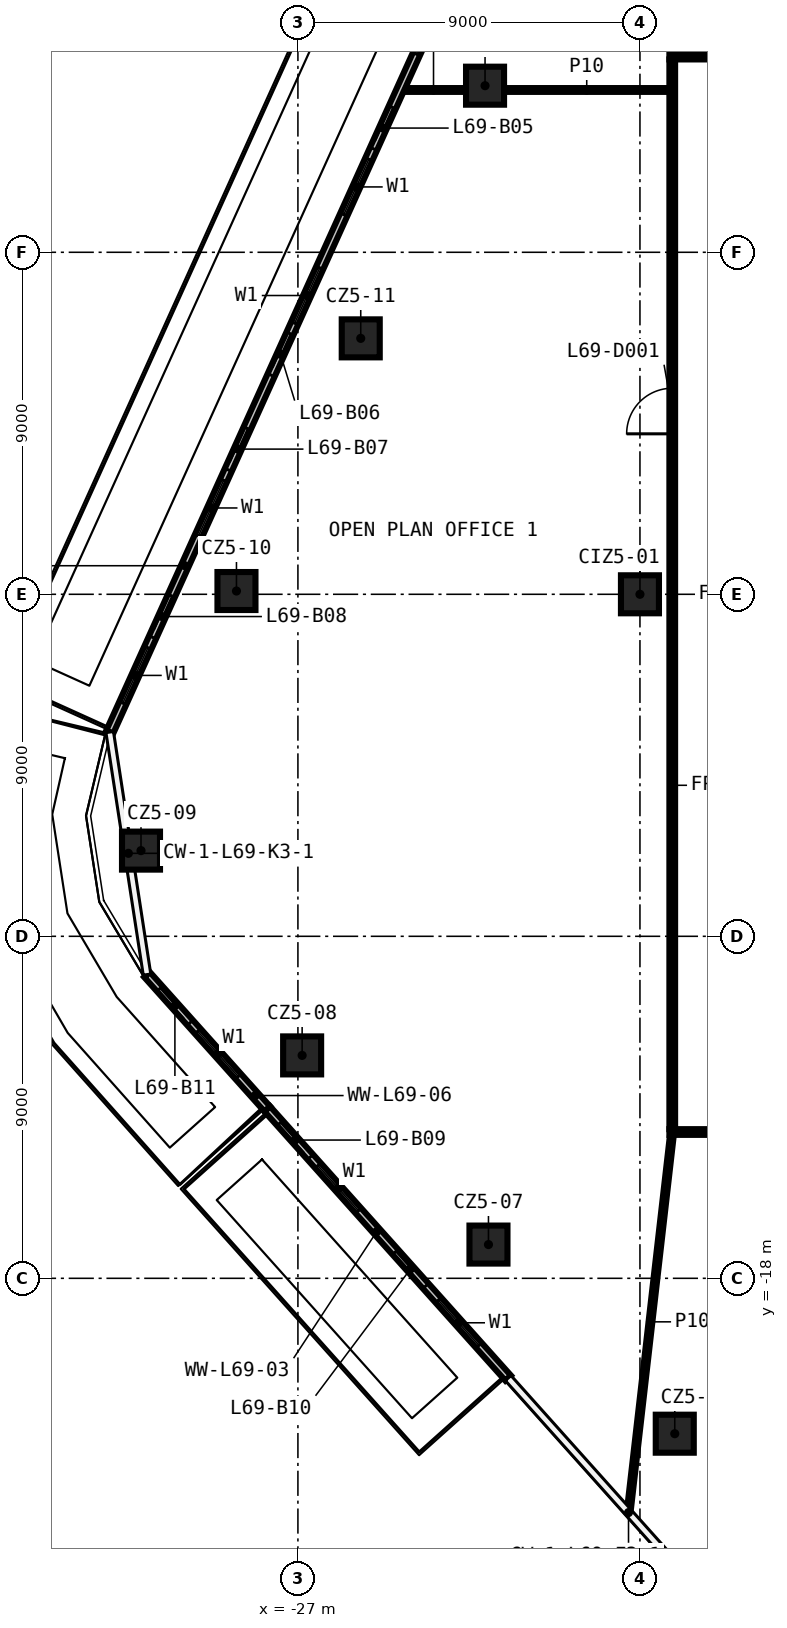
"""IFC4 building model, lengths in metres.
Left out: names, types, materials, properties, quantities, classifications, styles, units other than length and angle.
Written with IfcOpenShell. Run it as: python <this file> out.ifc"""

import sys

from ifc_helpers import new_model, si_unit, direction, frame, frame_2d, origin, origin_2d, place, context, subcontext, project, spatial, rectangle, extrude, element, fill, save


model = new_model("IFC4")
c1 = context("Model", 3, precision=1e-05, world=origin(), true_north=direction((0.0, 1.0)))
c2 = subcontext(c1, "Body", "Model", "MODEL_VIEW")
j1 = project(units=[si_unit("LENGTHUNIT", "METRE"), si_unit("PLANEANGLEUNIT", "RADIAN")], contexts=[c1])
p1 = place(None, origin())
s1 = spatial("IfcSite", under=j1, at=p1, CompositionType="ELEMENT")
p2 = place(p1, origin())
s2 = spatial("IfcBuilding", under=s1, at=p2, CompositionType="ELEMENT")
p3 = place(p2, frame((0.0, 0.0, 323.6)))
s3 = spatial("IfcBuildingStorey", under=s2, at=p3, CompositionType="ELEMENT", Elevation=323.6)
for number, where, z_axis, x_axis in (
    (1, (-17.084, -22.089, 0.0), (0.0, 0.0, 1.0), (1.0, 0.0, 0.0)),
    (2, (-21.986, -17.112, 0.0), (0.0, 0.0, 1.0), (1.0, 0.0, 0.0)),
    (3, (-26.889, -12.134, 0.0), (0.0, 0.0, 1.0), (1.0, 0.0, 0.0)),
    (4, (-31.129, -6.745, 0.0), (0.0, 0.0, 1.0), (1.0, 0.0, 0.0)),
    (5, (-28.617, 0.086, 0.0), (0.0, 0.0, 1.0), (1.0, 0.0, 0.0)),
    (6, (-25.347, 6.735, 0.0), (0.0, 0.0, 1.0), (1.0, 0.0, 0.0)),
    (7, (-22.076, 13.384, 0.0), (0.0, 0.0, 1.0), (1.0, 0.0, 0.0)),
    (8, (-18.0, 0.0, 0.0), (0.0, 0.0, 1.0), (1.0, 0.0, 0.0)),
):
    element("IfcColumn", number, at=place(p3, frame(where, z_axis=z_axis, x_axis=x_axis)), inside=s3, PredefinedType="COLUMN", context=c2, shape_type="SweptSolid", body=[
        extrude(rectangle(XDim=1.0, YDim=1.0, at=origin_2d()), origin(), (0.0, 0.0, 1.0), 3.82),
    ])
p4 = place(p3, frame((17.225, -14.15, 0.0), z_axis=(0.0, 0.0, 1.0), x_axis=(-1.0, 0.0, 0.0)))
e9 = element("IfcWall", 9, at=p4, inside=s3, PredefinedType="PARTITIONING", context=c2, shape_type="SweptSolid", body=[
    extrude(rectangle(XDim=34.45, YDim=0.15, at=frame_2d((17.225, 0.0))), origin(), (0.0, 0.0, 1.0), 3.82),
])
p5 = place(p4, frame((17.711, 0.0, 0.0)))
e10 = element("IfcOpeningElement", 10, at=p5, cuts=e9, PredefinedType="OPENING", context=c2, shape_type="SweptSolid", body=[
    extrude(rectangle(XDim=1.2, YDim=2.1, at=frame_2d((0.6, 1.05))), frame((0.0, 0.085, 0.0), z_axis=(0.0, -1.0, 0.0), x_axis=(1.0, 0.0, 0.0)), (0.0, 0.0, 1.0), 0.17),
])
p6 = place(p4, frame((4.094, 0.0, 0.0)))
e11 = element("IfcOpeningElement", 11, at=p6, cuts=e9, PredefinedType="OPENING", context=c2, shape_type="SweptSolid", body=[
    extrude(rectangle(XDim=1.2, YDim=2.1, at=frame_2d((0.6, 1.05))), frame((0.0, 0.085, 0.0), z_axis=(0.0, -1.0, 0.0), x_axis=(1.0, 0.0, 0.0)), (0.0, 0.0, 1.0), 0.17),
])
p7 = place(p3, frame((-24.288, 13.271, 0.0), z_axis=(0.0, 0.0, 1.0), x_axis=(1.0, 0.0, 0.0)))
e12 = element("IfcWall", 12, at=p7, inside=s3, PredefinedType="PARTITIONING", context=c2, shape_type="SweptSolid", body=[
    extrude(rectangle(XDim=1.712, YDim=0.1, at=frame_2d((0.856, 0.0))), origin(), (0.0, 0.0, 1.0), 3.82),
])
p8 = place(p3, frame((-21.576, 13.271, 0.0), z_axis=(0.0, 0.0, 1.0), x_axis=(1.0, 0.0, 0.0)))
e13 = element("IfcWall", 13, at=p8, inside=s3, PredefinedType="PARTITIONING", context=c2, shape_type="SweptSolid", body=[
    extrude(rectangle(XDim=4.351, YDim=0.1, at=frame_2d((2.175, 0.0))), origin(), (0.0, 0.0, 1.0), 3.82),
])
p9 = place(p3, frame((-17.225, 14.15, 0.0), z_axis=(0.0, 0.0, 1.0), x_axis=(1.0, 0.0, 0.0)))
e14 = element("IfcWall", 14, at=p9, inside=s3, PredefinedType="PARTITIONING", context=c2, shape_type="SweptSolid", body=[
    extrude(rectangle(XDim=34.45, YDim=0.15, at=frame_2d((17.225, 0.0))), origin(), (0.0, 0.0, 1.0), 3.82),
])
p10 = place(p9, frame((17.706, 0.0, 0.0)))
e15 = element("IfcOpeningElement", 15, at=p10, cuts=e14, PredefinedType="OPENING", context=c2, shape_type="SweptSolid", body=[
    extrude(rectangle(XDim=1.2, YDim=2.1, at=frame_2d((0.6, 1.05))), frame((0.0, 0.085, 0.0), z_axis=(0.0, -1.0, 0.0), x_axis=(1.0, 0.0, 0.0)), (0.0, 0.0, 1.0), 0.17),
])
p11 = place(p3, frame((-18.296, -24.14, 0.0), z_axis=(0.0, 0.0, 1.0), x_axis=(0.11391359401, 0.993490660801, 0.0)))
e16 = element("IfcWall", 16, at=p11, inside=s3, PredefinedType="PARTITIONING", context=c2, shape_type="SweptSolid", body=[
    extrude(rectangle(XDim=10.056, YDim=0.1, at=frame_2d((5.028, 0.0))), origin(), (0.0, 0.0, 1.0), 3.82),
])
p12 = place(p3, frame((-17.15, -14.075, 0.0), z_axis=(0.0, 0.0, 1.0), x_axis=(0.0, 1.0, 0.0)))
e17 = element("IfcWall", 17, at=p12, inside=s3, PredefinedType="PARTITIONING", context=c2, shape_type="SweptSolid", body=[
    extrude(rectangle(XDim=28.15, YDim=0.15, at=frame_2d((14.075, 0.0))), origin(), (0.0, 0.0, 1.0), 3.82),
])
p13 = place(p12, frame((18.298, 0.0, 0.0)))
e18 = element("IfcOpeningElement", 18, at=p13, cuts=e17, PredefinedType="OPENING", context=c2, shape_type="SweptSolid", body=[
    extrude(rectangle(XDim=1.2, YDim=2.1, at=frame_2d((0.6, 1.05))), frame((0.0, 0.085, 0.0), z_axis=(0.0, -1.0, 0.0), x_axis=(1.0, 0.0, 0.0)), (0.0, 0.0, 1.0), 0.17),
])
p14 = place(p3, frame((-22.399, 17.495, 0.0), z_axis=(0.0, 0.0, 1.0), x_axis=(-0.412123946496, -0.911127791654, 0.0)))
e19 = element("IfcWall", 19, at=p14, inside=s3, PredefinedType="SOLIDWALL", context=c2, shape_type="SweptSolid", body=[
    extrude(rectangle(XDim=23.18, YDim=0.2, at=frame_2d((11.59, 0.0))), origin(), (0.0, 0.0, 1.0), 3.82),
])
p15 = place(p14, frame((2.0, 0.0, 0.6)))
e20 = element("IfcOpeningElement", 20, at=p15, cuts=e19, PredefinedType="OPENING", context=c2, shape_type="SweptSolid", body=[
    extrude(rectangle(XDim=1.6, YDim=2.4, at=frame_2d((0.8, 1.2))), frame((0.0, 0.11, 0.0), z_axis=(0.0, -1.0, 0.0), x_axis=(1.0, 0.0, 0.0)), (0.0, 0.0, 1.0), 0.22),
])
p16 = place(p14, frame((0.5, 0.0, 0.0)))
e21 = element("IfcOpeningElement", 21, at=p16, cuts=e19, PredefinedType="OPENING", context=c2, shape_type="SweptSolid", body=[
    extrude(rectangle(XDim=1.2, YDim=2.4, at=frame_2d((0.6, 1.2))), frame((0.0, 0.11, 0.0), z_axis=(0.0, -1.0, 0.0), x_axis=(1.0, 0.0, 0.0)), (0.0, 0.0, 1.0), 0.22),
])
p17 = place(p14, frame((6.636, 0.0, 0.6)))
e22 = element("IfcOpeningElement", 22, at=p17, cuts=e19, PredefinedType="OPENING", context=c2, shape_type="SweptSolid", body=[
    extrude(rectangle(XDim=1.6, YDim=2.4, at=frame_2d((0.8, 1.2))), frame((0.0, 0.11, 0.0), z_axis=(0.0, -1.0, 0.0), x_axis=(1.0, 0.0, 0.0)), (0.0, 0.0, 1.0), 0.22),
])
p18 = place(p14, frame((5.136, 0.0, 0.0)))
e23 = element("IfcOpeningElement", 23, at=p18, cuts=e19, PredefinedType="OPENING", context=c2, shape_type="SweptSolid", body=[
    extrude(rectangle(XDim=1.2, YDim=2.4, at=frame_2d((0.6, 1.2))), frame((0.0, 0.11, 0.0), z_axis=(0.0, -1.0, 0.0), x_axis=(1.0, 0.0, 0.0)), (0.0, 0.0, 1.0), 0.22),
])
p19 = place(p14, frame((9.772, 0.0, 0.6)))
e24 = element("IfcOpeningElement", 24, at=p19, cuts=e19, PredefinedType="OPENING", context=c2, shape_type="SweptSolid", body=[
    extrude(rectangle(XDim=1.6, YDim=2.4, at=frame_2d((0.8, 1.2))), frame((0.0, 0.11, 0.0), z_axis=(0.0, -1.0, 0.0), x_axis=(1.0, 0.0, 0.0)), (0.0, 0.0, 1.0), 0.22),
])
p20 = place(p14, frame((11.672, 0.0, 0.0)))
e25 = element("IfcOpeningElement", 25, at=p20, cuts=e19, PredefinedType="OPENING", context=c2, shape_type="SweptSolid", body=[
    extrude(rectangle(XDim=1.2, YDim=2.4, at=frame_2d((0.6, 1.2))), frame((0.0, 0.11, 0.0), z_axis=(0.0, -1.0, 0.0), x_axis=(1.0, 0.0, 0.0)), (0.0, 0.0, 1.0), 0.22),
])
p21 = place(p14, frame((15.908, 0.0, 0.6)))
e26 = element("IfcOpeningElement", 26, at=p21, cuts=e19, PredefinedType="OPENING", context=c2, shape_type="SweptSolid", body=[
    extrude(rectangle(XDim=1.6, YDim=2.4, at=frame_2d((0.8, 1.2))), frame((0.0, 0.11, 0.0), z_axis=(0.0, -1.0, 0.0), x_axis=(1.0, 0.0, 0.0)), (0.0, 0.0, 1.0), 0.22),
])
p22 = place(p14, frame((14.408, 0.0, 0.0)))
e27 = element("IfcOpeningElement", 27, at=p22, cuts=e19, PredefinedType="OPENING", context=c2, shape_type="SweptSolid", body=[
    extrude(rectangle(XDim=1.2, YDim=2.4, at=frame_2d((0.6, 1.2))), frame((0.0, 0.11, 0.0), z_axis=(0.0, -1.0, 0.0), x_axis=(1.0, 0.0, 0.0)), (0.0, 0.0, 1.0), 0.22),
])
p23 = place(p14, frame((20.744, 0.0, 0.6)))
e28 = element("IfcOpeningElement", 28, at=p23, cuts=e19, PredefinedType="OPENING", context=c2, shape_type="SweptSolid", body=[
    extrude(rectangle(XDim=1.6, YDim=2.4, at=frame_2d((0.8, 1.2))), frame((0.0, 0.11, 0.0), z_axis=(0.0, -1.0, 0.0), x_axis=(1.0, 0.0, 0.0)), (0.0, 0.0, 1.0), 0.22),
])
p24 = place(p14, frame((19.244, 0.0, 0.0)))
e29 = element("IfcOpeningElement", 29, at=p24, cuts=e19, PredefinedType="OPENING", context=c2, shape_type="SweptSolid", body=[
    extrude(rectangle(XDim=1.2, YDim=2.4, at=frame_2d((0.6, 1.2))), frame((0.0, 0.11, 0.0), z_axis=(0.0, -1.0, 0.0), x_axis=(1.0, 0.0, 0.0)), (0.0, 0.0, 1.0), 0.22),
])
p25 = place(p3, frame((-27.807, -13.542, 0.0), z_axis=(0.0, 0.0, 1.0), x_axis=(0.666894702572, -0.745151968179, 0.0)))
e30 = element("IfcWall", 30, at=p25, inside=s3, PredefinedType="SOLIDWALL", context=c2, shape_type="SweptSolid", body=[
    extrude(rectangle(XDim=9.506, YDim=0.2, at=frame_2d((4.753, 0.0))), origin(), (0.0, 0.0, 1.0), 3.82),
])
p26 = place(p25, frame((2.0, 0.0, 0.6)))
e31 = element("IfcOpeningElement", 31, at=p26, cuts=e30, PredefinedType="OPENING", context=c2, shape_type="SweptSolid", body=[
    extrude(rectangle(XDim=1.6, YDim=2.4, at=frame_2d((0.8, 1.2))), frame((0.0, 0.11, 0.0), z_axis=(0.0, -1.0, 0.0), x_axis=(1.0, 0.0, 0.0)), (0.0, 0.0, 1.0), 0.22),
])
p27 = place(p25, frame((0.5, 0.0, 0.0)))
e32 = element("IfcOpeningElement", 32, at=p27, cuts=e30, PredefinedType="OPENING", context=c2, shape_type="SweptSolid", body=[
    extrude(rectangle(XDim=1.2, YDim=2.4, at=frame_2d((0.6, 1.2))), frame((0.0, 0.11, 0.0), z_axis=(0.0, -1.0, 0.0), x_axis=(1.0, 0.0, 0.0)), (0.0, 0.0, 1.0), 0.22),
])
p28 = place(p25, frame((6.753, 0.0, 0.6)))
e33 = element("IfcOpeningElement", 33, at=p28, cuts=e30, PredefinedType="OPENING", context=c2, shape_type="SweptSolid", body=[
    extrude(rectangle(XDim=1.6, YDim=2.4, at=frame_2d((0.8, 1.2))), frame((0.0, 0.11, 0.0), z_axis=(0.0, -1.0, 0.0), x_axis=(1.0, 0.0, 0.0)), (0.0, 0.0, 1.0), 0.22),
])
p29 = place(p25, frame((5.053, 0.0, 0.0)))
e34 = element("IfcOpeningElement", 34, at=p29, cuts=e30, PredefinedType="OPENING", context=c2, shape_type="SweptSolid", body=[
    extrude(rectangle(XDim=1.2, YDim=2.4, at=frame_2d((0.6, 1.2))), frame((0.0, 0.11, 0.0), z_axis=(0.0, -1.0, 0.0), x_axis=(1.0, 0.0, 0.0)), (0.0, 0.0, 1.0), 0.22),
])
p30 = place(p3, frame((-30.97, -10.007, 0.0), z_axis=(0.0, 0.0, 1.0), x_axis=(0.666852029375, -0.745190157556, 0.0)))
e35 = element("IfcWall", 35, at=p30, inside=s3, PredefinedType="SOLIDWALL", context=c2, shape_type="SweptSolid", body=[
    extrude(rectangle(XDim=4.743, YDim=0.2, at=frame_2d((2.372, 0.0))), origin(), (0.0, 0.0, 1.0), 3.82),
])
p31 = place(p30, frame((2.0, 0.0, 0.6)))
e36 = element("IfcOpeningElement", 36, at=p31, cuts=e35, PredefinedType="OPENING", context=c2, shape_type="SweptSolid", body=[
    extrude(rectangle(XDim=1.6, YDim=2.4, at=frame_2d((0.8, 1.2))), frame((0.0, 0.11, 0.0), z_axis=(0.0, -1.0, 0.0), x_axis=(1.0, 0.0, 0.0)), (0.0, 0.0, 1.0), 0.22),
])
p32 = place(p30, frame((0.5, 0.0, 0.0)))
e37 = element("IfcOpeningElement", 37, at=p32, cuts=e35, PredefinedType="OPENING", context=c2, shape_type="SweptSolid", body=[
    extrude(rectangle(XDim=1.2, YDim=2.4, at=frame_2d((0.6, 1.2))), frame((0.0, 0.11, 0.0), z_axis=(0.0, -1.0, 0.0), x_axis=(1.0, 0.0, 0.0)), (0.0, 0.0, 1.0), 0.22),
])
p33 = place(p13, origin())
e38 = element("IfcDoor", 38, at=p33, inside=s3, OperationType="SINGLE_SWING_RIGHT", PredefinedType="DOOR", context=c2, shape_type="SweptSolid", body=[
    extrude(rectangle(XDim=1.2, YDim=2.1, at=frame_2d((0.6, 1.05))), frame((0.0, 0.025, 0.0), z_axis=(0.0, -1.0, 0.0), x_axis=(1.0, 0.0, 0.0)), (0.0, 0.0, 1.0), 0.05),
])
fill(e18, e38)
p34 = place(p15, origin())
e39 = element("IfcWindow", 39, at=p34, inside=s3, PartitioningType="SINGLE_PANEL", PredefinedType="WINDOW", context=c2, shape_type="SweptSolid", body=[
    extrude(rectangle(XDim=1.6, YDim=2.4, at=frame_2d((0.8, 1.2))), frame((0.0, 0.03, 0.0), z_axis=(0.0, -1.0, 0.0), x_axis=(1.0, 0.0, 0.0)), (0.0, 0.0, 1.0), 0.06),
])
fill(e20, e39)
p35 = place(p17, origin())
e40 = element("IfcWindow", 40, at=p35, inside=s3, PartitioningType="SINGLE_PANEL", PredefinedType="WINDOW", context=c2, shape_type="SweptSolid", body=[
    extrude(rectangle(XDim=1.6, YDim=2.4, at=frame_2d((0.8, 1.2))), frame((0.0, 0.03, 0.0), z_axis=(0.0, -1.0, 0.0), x_axis=(1.0, 0.0, 0.0)), (0.0, 0.0, 1.0), 0.06),
])
fill(e22, e40)
p36 = place(p18, origin())
e41 = element("IfcDoor", 41, at=p36, inside=s3, OperationType="SLIDING_TO_LEFT", PredefinedType="DOOR", context=c2, shape_type="SweptSolid", body=[
    extrude(rectangle(XDim=1.2, YDim=2.4, at=frame_2d((0.6, 1.2))), frame((0.0, 0.025, 0.0), z_axis=(0.0, -1.0, 0.0), x_axis=(1.0, 0.0, 0.0)), (0.0, 0.0, 1.0), 0.05),
])
fill(e23, e41)
p37 = place(p19, origin())
e42 = element("IfcWindow", 42, at=p37, inside=s3, PartitioningType="SINGLE_PANEL", PredefinedType="WINDOW", context=c2, shape_type="SweptSolid", body=[
    extrude(rectangle(XDim=1.6, YDim=2.4, at=frame_2d((0.8, 1.2))), frame((0.0, 0.03, 0.0), z_axis=(0.0, -1.0, 0.0), x_axis=(1.0, 0.0, 0.0)), (0.0, 0.0, 1.0), 0.06),
])
fill(e24, e42)
p38 = place(p20, origin())
e43 = element("IfcDoor", 43, at=p38, inside=s3, OperationType="SLIDING_TO_LEFT", PredefinedType="DOOR", context=c2, shape_type="SweptSolid", body=[
    extrude(rectangle(XDim=1.2, YDim=2.4, at=frame_2d((0.6, 1.2))), frame((0.0, 0.025, 0.0), z_axis=(0.0, -1.0, 0.0), x_axis=(1.0, 0.0, 0.0)), (0.0, 0.0, 1.0), 0.05),
])
fill(e25, e43)
p39 = place(p21, origin())
e44 = element("IfcWindow", 44, at=p39, inside=s3, PartitioningType="SINGLE_PANEL", PredefinedType="WINDOW", context=c2, shape_type="SweptSolid", body=[
    extrude(rectangle(XDim=1.6, YDim=2.4, at=frame_2d((0.8, 1.2))), frame((0.0, 0.03, 0.0), z_axis=(0.0, -1.0, 0.0), x_axis=(1.0, 0.0, 0.0)), (0.0, 0.0, 1.0), 0.06),
])
fill(e26, e44)
p40 = place(p22, origin())
e45 = element("IfcDoor", 45, at=p40, inside=s3, OperationType="SLIDING_TO_LEFT", PredefinedType="DOOR", context=c2, shape_type="SweptSolid", body=[
    extrude(rectangle(XDim=1.2, YDim=2.4, at=frame_2d((0.6, 1.2))), frame((0.0, 0.025, 0.0), z_axis=(0.0, -1.0, 0.0), x_axis=(1.0, 0.0, 0.0)), (0.0, 0.0, 1.0), 0.05),
])
fill(e27, e45)
p41 = place(p23, origin())
e46 = element("IfcWindow", 46, at=p41, inside=s3, PartitioningType="SINGLE_PANEL", PredefinedType="WINDOW", context=c2, shape_type="SweptSolid", body=[
    extrude(rectangle(XDim=1.6, YDim=2.4, at=frame_2d((0.8, 1.2))), frame((0.0, 0.03, 0.0), z_axis=(0.0, -1.0, 0.0), x_axis=(1.0, 0.0, 0.0)), (0.0, 0.0, 1.0), 0.06),
])
fill(e28, e46)
p42 = place(p24, origin())
e47 = element("IfcDoor", 47, at=p42, inside=s3, OperationType="SLIDING_TO_LEFT", PredefinedType="DOOR", context=c2, shape_type="SweptSolid", body=[
    extrude(rectangle(XDim=1.2, YDim=2.4, at=frame_2d((0.6, 1.2))), frame((0.0, 0.025, 0.0), z_axis=(0.0, -1.0, 0.0), x_axis=(1.0, 0.0, 0.0)), (0.0, 0.0, 1.0), 0.05),
])
fill(e29, e47)
p43 = place(p26, origin())
e48 = element("IfcWindow", 48, at=p43, inside=s3, PartitioningType="SINGLE_PANEL", PredefinedType="WINDOW", context=c2, shape_type="SweptSolid", body=[
    extrude(rectangle(XDim=1.6, YDim=2.4, at=frame_2d((0.8, 1.2))), frame((0.0, 0.03, 0.0), z_axis=(0.0, -1.0, 0.0), x_axis=(1.0, 0.0, 0.0)), (0.0, 0.0, 1.0), 0.06),
])
fill(e31, e48)
p44 = place(p27, origin())
e49 = element("IfcDoor", 49, at=p44, inside=s3, OperationType="SLIDING_TO_LEFT", PredefinedType="DOOR", context=c2, shape_type="SweptSolid", body=[
    extrude(rectangle(XDim=1.2, YDim=2.4, at=frame_2d((0.6, 1.2))), frame((0.0, 0.025, 0.0), z_axis=(0.0, -1.0, 0.0), x_axis=(1.0, 0.0, 0.0)), (0.0, 0.0, 1.0), 0.05),
])
fill(e32, e49)
p45 = place(p28, origin())
e50 = element("IfcWindow", 50, at=p45, inside=s3, PartitioningType="SINGLE_PANEL", PredefinedType="WINDOW", context=c2, shape_type="SweptSolid", body=[
    extrude(rectangle(XDim=1.6, YDim=2.4, at=frame_2d((0.8, 1.2))), frame((0.0, 0.03, 0.0), z_axis=(0.0, -1.0, 0.0), x_axis=(1.0, 0.0, 0.0)), (0.0, 0.0, 1.0), 0.06),
])
fill(e33, e50)
p46 = place(p29, origin())
e51 = element("IfcDoor", 51, at=p46, inside=s3, OperationType="SLIDING_TO_LEFT", PredefinedType="DOOR", context=c2, shape_type="SweptSolid", body=[
    extrude(rectangle(XDim=1.2, YDim=2.4, at=frame_2d((0.6, 1.2))), frame((0.0, 0.025, 0.0), z_axis=(0.0, -1.0, 0.0), x_axis=(1.0, 0.0, 0.0)), (0.0, 0.0, 1.0), 0.05),
])
fill(e34, e51)
p47 = place(p31, origin())
e52 = element("IfcWindow", 52, at=p47, inside=s3, PartitioningType="SINGLE_PANEL", PredefinedType="WINDOW", context=c2, shape_type="SweptSolid", body=[
    extrude(rectangle(XDim=1.6, YDim=2.4, at=frame_2d((0.8, 1.2))), frame((0.0, 0.03, 0.0), z_axis=(0.0, -1.0, 0.0), x_axis=(1.0, 0.0, 0.0)), (0.0, 0.0, 1.0), 0.06),
])
fill(e36, e52)
p48 = place(p32, origin())
e53 = element("IfcDoor", 53, at=p48, inside=s3, OperationType="SLIDING_TO_LEFT", PredefinedType="DOOR", context=c2, shape_type="SweptSolid", body=[
    extrude(rectangle(XDim=1.2, YDim=2.4, at=frame_2d((0.6, 1.2))), frame((0.0, 0.025, 0.0), z_axis=(0.0, -1.0, 0.0), x_axis=(1.0, 0.0, 0.0)), (0.0, 0.0, 1.0), 0.05),
])
fill(e37, e53)
save(model, sys.argv[1])
